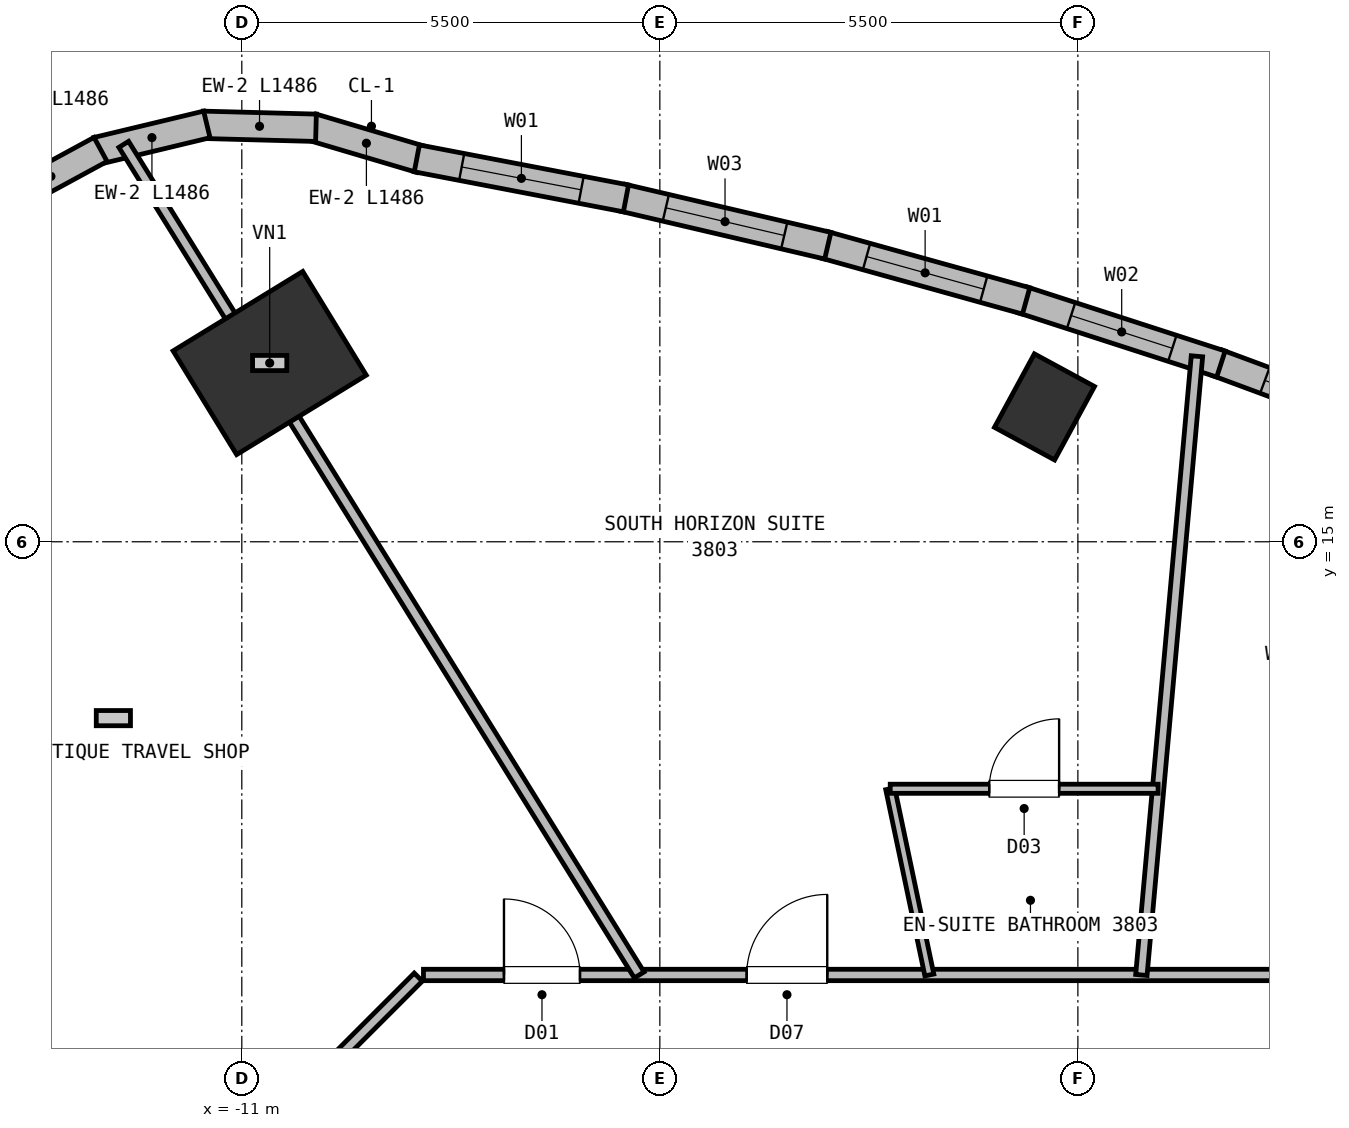
"""IFC4 building model, lengths in metres.
Left out: names, types, materials, properties, quantities, classifications, styles, units other than length and angle.
Written with IfcOpenShell. Run it as: python <this file> out.ifc"""

import sys

from ifc_helpers import new_model, si_unit, direction, frame, frame_2d, origin, origin_2d, place, context, subcontext, project, spatial, rectangle, extrude, element, fill, save


model = new_model("IFC4")
c1 = context("Model", 3, precision=1e-05, world=origin(), true_north=direction((0.0, 1.0)))
c2 = subcontext(c1, "Body", "Model", "MODEL_VIEW")
j1 = project(units=[si_unit("LENGTHUNIT", "METRE"), si_unit("PLANEANGLEUNIT", "RADIAN")], contexts=[c1])
p1 = place(None, origin())
s1 = spatial("IfcSite", under=j1, at=p1, CompositionType="ELEMENT")
p2 = place(p1, origin())
s2 = spatial("IfcBuilding", under=s1, at=p2, CompositionType="ELEMENT")
p3 = place(p2, frame((0.0, 0.0, 142.25)))
s3 = spatial("IfcBuildingStorey", under=s2, at=p3, CompositionType="ELEMENT", Elevation=142.25)
p4 = place(p3, frame((-10.633, 17.352, 0.0), z_axis=(0.0, 0.0, 1.0), x_axis=(-0.522498564716, 0.852640164354, 0.0)))
e1 = element("IfcColumn", 1, at=p4, inside=s3, PredefinedType="COLUMN", context=c2, shape_type="SweptSolid", body=[
    extrude(rectangle(XDim=1.6, YDim=2.0, at=origin_2d()), origin(), (0.0, 0.0, 1.0), 3.75),
])
p5 = place(p3, frame((-0.439, 16.774, 0.0), z_axis=(0.0, 0.0, 1.0), x_axis=(-0.878817112662, 0.47715876026, 0.0)))
e2 = element("IfcColumn", 2, at=p5, inside=s3, PredefinedType="COLUMN", context=c2, shape_type="SweptSolid", body=[
    extrude(rectangle(XDim=0.9, YDim=1.1, at=origin_2d()), origin(), (0.0, 0.0, 1.0), 3.75),
])
for number, where, z_axis, x_axis in (
    (3, (-10.073, 20.455, 0.0), (0.0, 0.0, 1.0), (0.959, -0.284, 0.0)),
    (4, (-11.51, 20.486, 0.0), (0.0, 0.0, 1.0), (1.0, -0.026, 0.0)),
):
    element("IfcWall", number, at=place(p3, frame(where, z_axis=z_axis, x_axis=x_axis)), inside=s3, PredefinedType="SOLIDWALL", context=c2, shape_type="SweptSolid", body=[
        extrude(rectangle(XDim=1.486, YDim=0.36, at=frame_2d((0.743, 0.0))), origin(), (0.0, 0.0, 1.0), 3.5),
    ])
p6 = place(p3, frame((-12.905, 20.145, 0.0), z_axis=(0.0, 0.0, 1.0), x_axis=(0.972390285352, 0.233360521413, 0.0)))
e5 = element("IfcWall", 5, at=p6, inside=s3, PredefinedType="SOLIDWALL", context=c2, shape_type="SweptSolid", body=[
    extrude(rectangle(XDim=1.486, YDim=0.36, at=frame_2d((0.743, 0.0))), origin(), (0.0, 0.0, 1.0), 3.5),
])
p7 = place(p3, frame((-14.164, 19.453, 0.0), z_axis=(0.0, 0.0, 1.0), x_axis=(0.87890460574, 0.476997582812, 0.0)))
e6 = element("IfcWall", 6, at=p7, inside=s3, PredefinedType="SOLIDWALL", context=c2, shape_type="SweptSolid", body=[
    extrude(rectangle(XDim=1.486, YDim=0.36, at=frame_2d((0.743, 0.0))), origin(), (0.0, 0.0, 1.0), 3.5),
])
p8 = place(p3, frame((1.835, 17.355, 0.0), z_axis=(0.0, 0.0, 1.0), x_axis=(0.937570914704, -0.347794163121, 0.0)))
e7 = element("IfcWall", 7, at=p8, inside=s3, PredefinedType="SOLIDWALL", context=c2, shape_type="SweptSolid", body=[
    extrude(rectangle(XDim=2.734, YDim=0.36, at=frame_2d((1.367, 0.0))), origin(), (0.0, 0.0, 1.0), 3.5),
])
p9 = place(p8, frame((0.667, 0.0, 0.72)))
e8 = element("IfcOpeningElement", 8, at=p9, cuts=e7, PredefinedType="OPENING", context=c2, shape_type="SweptSolid", body=[
    extrude(rectangle(XDim=1.4, YDim=1.84, at=frame_2d((0.7, 0.92))), frame((0.0, 0.19, 0.0), z_axis=(0.0, -1.0, 0.0), x_axis=(1.0, 0.0, 0.0)), (0.0, 0.0, 1.0), 0.38),
])
p10 = place(p3, frame((-0.729, 18.184, 0.0), z_axis=(0.0, 0.0, 1.0), x_axis=(0.951405423372, -0.307941098877, 0.0)))
e9 = element("IfcWall", 9, at=p10, inside=s3, PredefinedType="SOLIDWALL", context=c2, shape_type="SweptSolid", body=[
    extrude(rectangle(XDim=2.744, YDim=0.36, at=frame_2d((1.372, 0.0))), origin(), (0.0, 0.0, 1.0), 3.5),
])
p11 = place(p10, frame((0.672, 0.0, 0.72)))
e10 = element("IfcOpeningElement", 10, at=p11, cuts=e9, PredefinedType="OPENING", context=c2, shape_type="SweptSolid", body=[
    extrude(rectangle(XDim=1.4, YDim=1.84, at=frame_2d((0.7, 0.92))), frame((0.0, 0.19, 0.0), z_axis=(0.0, -1.0, 0.0), x_axis=(1.0, 0.0, 0.0)), (0.0, 0.0, 1.0), 0.38),
])
p12 = place(p3, frame((-3.339, 18.908, 0.0), z_axis=(0.0, 0.0, 1.0), x_axis=(0.963469710564, -0.267817319876, 0.0)))
e11 = element("IfcWall", 11, at=p12, inside=s3, PredefinedType="SOLIDWALL", context=c2, shape_type="SweptSolid", body=[
    extrude(rectangle(XDim=2.759, YDim=0.36, at=frame_2d((1.379, 0.0))), origin(), (0.0, 0.0, 1.0), 3.5),
])
p13 = place(p12, frame((0.579, 0.0, 0.72)))
e12 = element("IfcOpeningElement", 12, at=p13, cuts=e11, PredefinedType="OPENING", context=c2, shape_type="SweptSolid", body=[
    extrude(rectangle(XDim=1.6, YDim=1.88, at=frame_2d((0.8, 0.94))), frame((0.0, 0.19, 0.0), z_axis=(0.0, -1.0, 0.0), x_axis=(1.0, 0.0, 0.0)), (0.0, 0.0, 1.0), 0.38),
])
p14 = place(p3, frame((-5.995, 19.528, 0.0), z_axis=(0.0, 0.0, 1.0), x_axis=(0.973697722737, -0.227843684873, 0.0)))
e13 = element("IfcWall", 13, at=p14, inside=s3, PredefinedType="SOLIDWALL", context=c2, shape_type="SweptSolid", body=[
    extrude(rectangle(XDim=2.777, YDim=0.36, at=frame_2d((1.389, 0.0))), origin(), (0.0, 0.0, 1.0), 3.5),
])
p15 = place(p14, frame((0.589, 0.0, 0.72)))
e14 = element("IfcOpeningElement", 14, at=p15, cuts=e13, PredefinedType="OPENING", context=c2, shape_type="SweptSolid", body=[
    extrude(rectangle(XDim=1.6, YDim=1.88, at=frame_2d((0.8, 0.94))), frame((0.0, 0.19, 0.0), z_axis=(0.0, -1.0, 0.0), x_axis=(1.0, 0.0, 0.0)), (0.0, 0.0, 1.0), 0.38),
])
p16 = place(p3, frame((-8.697, 20.045, 0.0), z_axis=(0.0, 0.0, 1.0), x_axis=(0.982153479192, -0.188081214668, 0.0)))
e15 = element("IfcWall", 15, at=p16, inside=s3, PredefinedType="SOLIDWALL", context=c2, shape_type="SweptSolid", body=[
    extrude(rectangle(XDim=2.801, YDim=0.36, at=frame_2d((1.401, 0.0))), origin(), (0.0, 0.0, 1.0), 3.5),
])
p17 = place(p16, frame((0.601, 0.0, 0.72)))
e16 = element("IfcOpeningElement", 16, at=p17, cuts=e15, PredefinedType="OPENING", context=c2, shape_type="SweptSolid", body=[
    extrude(rectangle(XDim=1.6, YDim=1.88, at=frame_2d((0.8, 0.94))), frame((0.0, 0.19, 0.0), z_axis=(0.0, -1.0, 0.0), x_axis=(1.0, 0.0, 0.0)), (0.0, 0.0, 1.0), 0.38),
])
p18 = place(p3, frame((-8.61, 9.3, 0.0), z_axis=(0.0, 0.0, 1.0), x_axis=(1.0, 0.0, 0.0)))
e17 = element("IfcWall", 17, at=p18, inside=s3, PredefinedType="PARTITIONING", context=c2, shape_type="SweptSolid", body=[
    extrude(rectangle(XDim=17.22, YDim=0.15, at=frame_2d((8.61, 0.0))), origin(), (0.0, 0.0, 1.0), 3.5),
])
p19 = place(p18, frame((11.966, 0.0, 0.0)))
e18 = element("IfcOpeningElement", 18, at=p19, cuts=e17, PredefinedType="OPENING", context=c2, shape_type="SweptSolid", body=[
    extrude(rectangle(XDim=1.0, YDim=2.15, at=frame_2d((0.5, 1.075))), frame((0.0, 0.085, 0.0), z_axis=(0.0, -1.0, 0.0), x_axis=(1.0, 0.0, 0.0)), (0.0, 0.0, 1.0), 0.17),
])
p20 = place(p18, frame((1.059, 0.0, 0.0)))
e19 = element("IfcOpeningElement", 19, at=p20, cuts=e17, PredefinedType="OPENING", context=c2, shape_type="SweptSolid", body=[
    extrude(rectangle(XDim=1.0, YDim=2.15, at=frame_2d((0.5, 1.075))), frame((0.0, 0.085, 0.0), z_axis=(0.0, -1.0, 0.0), x_axis=(1.0, 0.0, 0.0)), (0.0, 0.0, 1.0), 0.17),
])
p21 = place(p18, frame((4.252, 0.0, 0.0)))
e20 = element("IfcOpeningElement", 20, at=p21, cuts=e17, PredefinedType="OPENING", context=c2, shape_type="SweptSolid", body=[
    extrude(rectangle(XDim=1.06, YDim=2.15, at=frame_2d((0.53, 1.075))), frame((0.0, 0.085, 0.0), z_axis=(0.0, -1.0, 0.0), x_axis=(1.0, 0.0, 0.0)), (0.0, 0.0, 1.0), 0.17),
])
p22 = place(p3, frame((-10.722, 7.228, 0.0), z_axis=(0.0, 0.0, 1.0), x_axis=(0.707106781187, 0.707106781187, 0.0)))
e21 = element("IfcWall", 21, at=p22, inside=s3, PredefinedType="PARTITIONING", context=c2, shape_type="SweptSolid", body=[
    extrude(rectangle(XDim=2.89, YDim=0.15, at=frame_2d((1.445, 0.0))), origin(), (0.0, 0.0, 1.0), 3.5),
])
p23 = place(p3, frame((0.835, 9.3, 0.0), z_axis=(0.0, 0.0, 1.0), x_axis=(0.089461102412, 0.995990316798, 0.0)))
e22 = element("IfcWall", 22, at=p23, inside=s3, PredefinedType="PARTITIONING", context=c2, shape_type="SweptSolid", body=[
    extrude(rectangle(XDim=8.173, YDim=0.15, at=frame_2d((4.087, 0.0))), origin(), (0.0, 0.0, 1.0), 3.5),
])
p24 = place(p3, frame((-1.954, 9.3, 0.0), z_axis=(0.0, 0.0, 1.0), x_axis=(-0.205671344661, 0.978621120754, 0.0)))
e23 = element("IfcWall", 23, at=p24, inside=s3, PredefinedType="PARTITIONING", context=c2, shape_type="SweptSolid", body=[
    extrude(rectangle(XDim=2.503, YDim=0.12, at=frame_2d((1.252, 0.0))), origin(), (0.0, 0.0, 1.0), 3.5),
])
p25 = place(p3, frame((-2.469, 11.75, 0.0), z_axis=(0.0, 0.0, 1.0), x_axis=(1.0, 0.0, 0.0)))
e24 = element("IfcWall", 24, at=p25, inside=s3, PredefinedType="PARTITIONING", context=c2, shape_type="SweptSolid", body=[
    extrude(rectangle(XDim=3.524, YDim=0.12, at=frame_2d((1.762, 0.0))), origin(), (0.0, 0.0, 1.0), 3.5),
])
p26 = place(p25, frame((1.302, 0.0, 0.0)))
e25 = element("IfcOpeningElement", 25, at=p26, cuts=e24, PredefinedType="OPENING", context=c2, shape_type="SweptSolid", body=[
    extrude(rectangle(XDim=0.92, YDim=2.1, at=frame_2d((0.46, 1.05))), frame((0.0, 0.07, 0.0), z_axis=(0.0, -1.0, 0.0), x_axis=(1.0, 0.0, 0.0)), (0.0, 0.0, 1.0), 0.14),
])
p27 = place(p3, frame((-5.771, 9.3, 0.0), z_axis=(0.0, 0.0, 1.0), x_axis=(-0.527300490904, 0.849678875983, 0.0)))
e26 = element("IfcWall", 26, at=p27, inside=s3, PredefinedType="PARTITIONING", context=c2, shape_type="SweptSolid", body=[
    extrude(rectangle(XDim=12.862, YDim=0.15, at=frame_2d((6.431, 0.0))), origin(), (0.0, 0.0, 1.0), 3.5),
])
p28 = place(p3, frame((-10.75, 5.719, 0.0), z_axis=(0.0, 0.0, 1.0), x_axis=(-0.882843253565, 0.469667743873, 0.0)))
e27 = element("IfcWall", 27, at=p28, inside=s3, PredefinedType="PARTITIONING", context=c2, shape_type="SweptSolid", body=[
    extrude(rectangle(XDim=7.023, YDim=0.15, at=frame_2d((3.511, 0.0))), origin(), (0.0, 0.0, 1.0), 3.5),
])
p29 = place(p9, origin())
e28 = element("IfcWindow", 28, at=p29, inside=s3, PartitioningType="SINGLE_PANEL", PredefinedType="WINDOW", context=c2, shape_type="SweptSolid", body=[
    extrude(rectangle(XDim=1.4, YDim=1.84, at=frame_2d((0.7, 0.92))), frame((0.0, 0.03, 0.0), z_axis=(0.0, -1.0, 0.0), x_axis=(1.0, 0.0, 0.0)), (0.0, 0.0, 1.0), 0.06),
])
fill(e8, e28)
p30 = place(p11, origin())
e29 = element("IfcWindow", 29, at=p30, inside=s3, PartitioningType="SINGLE_PANEL", PredefinedType="WINDOW", context=c2, shape_type="SweptSolid", body=[
    extrude(rectangle(XDim=1.4, YDim=1.84, at=frame_2d((0.7, 0.92))), frame((0.0, 0.03, 0.0), z_axis=(0.0, -1.0, 0.0), x_axis=(1.0, 0.0, 0.0)), (0.0, 0.0, 1.0), 0.06),
])
fill(e10, e29)
p31 = place(p13, origin())
e30 = element("IfcWindow", 30, at=p31, inside=s3, PartitioningType="SINGLE_PANEL", PredefinedType="WINDOW", context=c2, shape_type="SweptSolid", body=[
    extrude(rectangle(XDim=1.6, YDim=1.88, at=frame_2d((0.8, 0.94))), frame((0.0, 0.03, 0.0), z_axis=(0.0, -1.0, 0.0), x_axis=(1.0, 0.0, 0.0)), (0.0, 0.0, 1.0), 0.06),
])
fill(e12, e30)
p32 = place(p15, origin())
e31 = element("IfcWindow", 31, at=p32, inside=s3, PartitioningType="SINGLE_PANEL", PredefinedType="WINDOW", context=c2, shape_type="SweptSolid", body=[
    extrude(rectangle(XDim=1.6, YDim=1.88, at=frame_2d((0.8, 0.94))), frame((0.0, 0.03, 0.0), z_axis=(0.0, -1.0, 0.0), x_axis=(1.0, 0.0, 0.0)), (0.0, 0.0, 1.0), 0.06),
])
fill(e14, e31)
p33 = place(p17, origin())
e32 = element("IfcWindow", 32, at=p33, inside=s3, PartitioningType="SINGLE_PANEL", PredefinedType="WINDOW", context=c2, shape_type="SweptSolid", body=[
    extrude(rectangle(XDim=1.6, YDim=1.88, at=frame_2d((0.8, 0.94))), frame((0.0, 0.03, 0.0), z_axis=(0.0, -1.0, 0.0), x_axis=(1.0, 0.0, 0.0)), (0.0, 0.0, 1.0), 0.06),
])
fill(e16, e32)
p34 = place(p26, origin())
e33 = element("IfcDoor", 33, at=p34, inside=s3, OperationType="SINGLE_SWING_RIGHT", PredefinedType="DOOR", context=c2, shape_type="SweptSolid", body=[
    extrude(rectangle(XDim=0.92, YDim=2.1, at=frame_2d((0.46, 1.05))), frame((0.0, 0.025, 0.0), z_axis=(0.0, -1.0, 0.0), x_axis=(1.0, 0.0, 0.0)), (0.0, 0.0, 1.0), 0.05),
])
fill(e25, e33)
p35 = place(p20, origin())
e34 = element("IfcDoor", 34, at=p35, inside=s3, OperationType="SINGLE_SWING_LEFT", PredefinedType="DOOR", context=c2, shape_type="SweptSolid", body=[
    extrude(rectangle(XDim=1.0, YDim=2.15, at=frame_2d((0.5, 1.075))), frame((0.0, 0.025, 0.0), z_axis=(0.0, -1.0, 0.0), x_axis=(1.0, 0.0, 0.0)), (0.0, 0.0, 1.0), 0.05),
])
fill(e19, e34)
p36 = place(p21, origin())
e35 = element("IfcDoor", 35, at=p36, inside=s3, OperationType="SINGLE_SWING_RIGHT", PredefinedType="DOOR", context=c2, shape_type="SweptSolid", body=[
    extrude(rectangle(XDim=1.06, YDim=2.15, at=frame_2d((0.53, 1.075))), frame((0.0, 0.025, 0.0), z_axis=(0.0, -1.0, 0.0), x_axis=(1.0, 0.0, 0.0)), (0.0, 0.0, 1.0), 0.05),
])
fill(e20, e35)
save(model, sys.argv[1])
